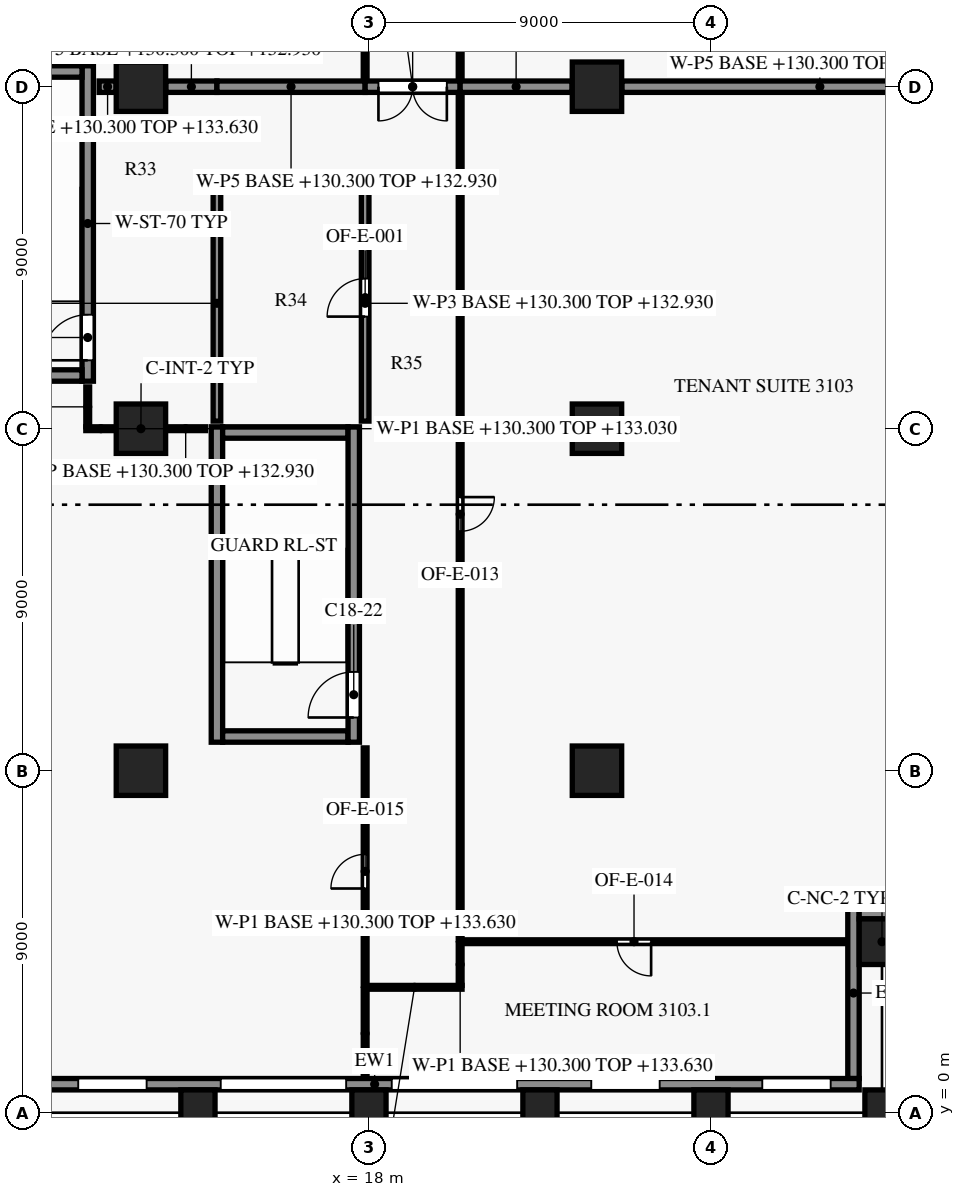
"""IFC4 building model, lengths in metres.
Left out: names, types, materials, properties, quantities, classifications, styles, units other than length and angle.
Written with IfcOpenShell. Run it as: python <this file> out.ifc"""

import sys

from ifc_helpers import new_model, si_unit, direction, frame, frame_2d, origin, origin_2d, place, context, subcontext, project, spatial, rectangle, extrude, element, fill, save


model = new_model("IFC4")
c1 = context("Model", 3, precision=1e-05, world=origin(), true_north=direction((0.0, 1.0)))
c2 = subcontext(c1, "Body", "Model", "MODEL_VIEW")
j1 = project(units=[si_unit("LENGTHUNIT", "METRE"), si_unit("PLANEANGLEUNIT", "RADIAN")], contexts=[c1])
p1 = place(None, origin())
s1 = spatial("IfcSite", under=j1, at=p1, CompositionType="ELEMENT")
p2 = place(p1, origin())
s2 = spatial("IfcBuilding", under=s1, at=p2, CompositionType="ELEMENT")
p3 = place(p2, frame((0.0, 0.0, 130.3)))
s3 = spatial("IfcBuildingStorey", under=s2, at=p3, CompositionType="ELEMENT", Elevation=130.3)
for number, where, z_axis, x_axis in (
    (1, (13.5, 0.0, 0.0), (0.0, 0.0, 1.0), (1.0, 0.0, 0.0)),
    (2, (18.0, 0.0, 0.0), (0.0, 0.0, 1.0), (1.0, 0.0, 0.0)),
    (3, (22.5, 0.0, 0.0), (0.0, 0.0, 1.0), (1.0, 0.0, 0.0)),
    (4, (27.0, 0.0, 0.0), (0.0, 0.0, 1.0), (1.0, 0.0, 0.0)),
    (5, (31.5, 0.0, 0.0), (0.0, 0.0, 1.0), (1.0, 0.0, 0.0)),
):
    element("IfcColumn", number, at=place(p3, frame(where, z_axis=z_axis, x_axis=x_axis)), inside=s3, PredefinedType="COLUMN", context=c2, shape_type="SweptSolid", body=[
        extrude(rectangle(XDim=0.9, YDim=1.2, at=origin_2d()), origin(), (0.0, 0.0, 1.0), 3.8),
    ])
p4 = place(p3, frame((31.5, 4.5, 0.0), z_axis=(0.0, 0.0, 1.0), x_axis=(1.0, 0.0, 0.0)))
e6 = element("IfcColumn", 6, at=p4, inside=s3, PredefinedType="COLUMN", context=c2, shape_type="SweptSolid", body=[
    extrude(rectangle(XDim=1.2, YDim=1.2, at=origin_2d()), origin(), (0.0, 0.0, 1.0), 3.8),
])
for number, where, z_axis, x_axis in (
    (7, (12.0, 9.0, 0.0), (0.0, 0.0, 1.0), (1.0, 0.0, 0.0)),
    (8, (12.0, 18.0, 0.0), (0.0, 0.0, 1.0), (1.0, 0.0, 0.0)),
    (9, (12.0, 27.0, 0.0), (0.0, 0.0, 1.0), (1.0, 0.0, 0.0)),
    (10, (24.0, 9.0, 0.0), (0.0, 0.0, 1.0), (1.0, 0.0, 0.0)),
    (11, (24.0, 18.0, 0.0), (0.0, 0.0, 1.0), (1.0, 0.0, 0.0)),
    (12, (24.0, 27.0, 0.0), (0.0, 0.0, 1.0), (1.0, 0.0, 0.0)),
):
    element("IfcColumn", number, at=place(p3, frame(where, z_axis=z_axis, x_axis=x_axis)), inside=s3, PredefinedType="COLUMN", context=c2, shape_type="SweptSolid", body=[
        extrude(rectangle(XDim=1.3, YDim=1.3, at=origin_2d()), origin(), (0.0, 0.0, 1.0), 3.8),
    ])
p5 = place(p3, frame((30.9, 0.75, 0.0), z_axis=(0.0, 0.0, 1.0), x_axis=(-1.0, 0.0, 0.0)))
e13 = element("IfcWall", 13, at=p5, inside=s3, PredefinedType="SOLIDWALL", context=c2, shape_type="SweptSolid", body=[
    extrude(rectangle(XDim=25.5, YDim=0.3, at=frame_2d((12.75, 0.0))), origin(), (0.0, 0.0, 1.0), 3.15),
])
p6 = place(p5, frame((0.75, 0.0, 0.75)))
e14 = element("IfcOpeningElement", 14, at=p6, cuts=e13, PredefinedType="OPENING", context=c2, shape_type="SweptSolid", body=[
    extrude(rectangle(XDim=1.8, YDim=1.8, at=frame_2d((0.9, 0.9))), frame((0.0, 0.16, 0.0), z_axis=(0.0, -1.0, 0.0), x_axis=(1.0, 0.0, 0.0)), (0.0, 0.0, 1.0), 0.32),
])
p7 = place(p5, frame((5.25, 0.0, 0.75)))
e15 = element("IfcOpeningElement", 15, at=p7, cuts=e13, PredefinedType="OPENING", context=c2, shape_type="SweptSolid", body=[
    extrude(rectangle(XDim=1.8, YDim=1.8, at=frame_2d((0.9, 0.9))), frame((0.0, 0.16, 0.0), z_axis=(0.0, -1.0, 0.0), x_axis=(1.0, 0.0, 0.0)), (0.0, 0.0, 1.0), 0.32),
])
p8 = place(p5, frame((9.0, 0.0, 0.15)))
e16 = element("IfcOpeningElement", 16, at=p8, cuts=e13, PredefinedType="OPENING", context=c2, shape_type="SweptSolid", body=[
    extrude(rectangle(XDim=3.3, YDim=2.4, at=frame_2d((1.65, 1.2))), frame((0.0, 0.16, 0.0), z_axis=(0.0, -1.0, 0.0), x_axis=(1.0, 0.0, 0.0)), (0.0, 0.0, 1.0), 0.32),
])
p9 = place(p5, frame((13.5, 0.0, 0.15)))
e17 = element("IfcOpeningElement", 17, at=p9, cuts=e13, PredefinedType="OPENING", context=c2, shape_type="SweptSolid", body=[
    extrude(rectangle(XDim=3.3, YDim=2.4, at=frame_2d((1.65, 1.2))), frame((0.0, 0.16, 0.0), z_axis=(0.0, -1.0, 0.0), x_axis=(1.0, 0.0, 0.0)), (0.0, 0.0, 1.0), 0.32),
])
p10 = place(p5, frame((18.75, 0.0, 0.75)))
e18 = element("IfcOpeningElement", 18, at=p10, cuts=e13, PredefinedType="OPENING", context=c2, shape_type="SweptSolid", body=[
    extrude(rectangle(XDim=1.8, YDim=1.8, at=frame_2d((0.9, 0.9))), frame((0.0, 0.16, 0.0), z_axis=(0.0, -1.0, 0.0), x_axis=(1.0, 0.0, 0.0)), (0.0, 0.0, 1.0), 0.32),
])
p11 = place(p5, frame((23.25, 0.0, 0.75)))
e19 = element("IfcOpeningElement", 19, at=p11, cuts=e13, PredefinedType="OPENING", context=c2, shape_type="SweptSolid", body=[
    extrude(rectangle(XDim=1.8, YDim=1.8, at=frame_2d((0.9, 0.9))), frame((0.0, 0.16, 0.0), z_axis=(0.0, -1.0, 0.0), x_axis=(1.0, 0.0, 0.0)), (0.0, 0.0, 1.0), 0.32),
])
p12 = place(p3, frame((30.75, 5.4, 0.0), z_axis=(0.0, 0.0, 1.0), x_axis=(0.0, -1.0, 0.0)))
e20 = element("IfcWall", 20, at=p12, inside=s3, PredefinedType="SOLIDWALL", context=c2, shape_type="SweptSolid", body=[
    extrude(rectangle(XDim=4.502, YDim=0.3, at=frame_2d((2.251, 0.0))), origin(), (0.0, 0.0, 1.0), 3.15),
])
p13 = place(p3, frame((35.787, 5.25, 0.0), z_axis=(0.0, 0.0, 1.0), x_axis=(-1.0, 0.0, 0.0)))
e21 = element("IfcWall", 21, at=p13, inside=s3, PredefinedType="SOLIDWALL", context=c2, shape_type="SweptSolid", body=[
    extrude(rectangle(XDim=4.887, YDim=0.3, at=frame_2d((2.444, 0.0))), origin(), (0.0, 0.0, 1.0), 3.15),
])
for number, where, z_axis, x_axis in (
    (22, (14.15, 9.9, 0.0), (0.0, 0.0, 1.0), (1.0, 0.0, 0.0)),
    (23, (14.15, 17.9, 0.0), (0.0, 0.0, 1.0), (1.0, 0.0, 0.0)),
    (24, (7.15, 19.4, 0.0), (0.0, 0.0, 1.0), (1.0, 0.0, 0.0)),
    (25, (7.15, 27.4, 0.0), (0.0, 0.0, 1.0), (1.0, 0.0, 0.0)),
):
    element("IfcWall", number, at=place(p3, frame(where, z_axis=z_axis, x_axis=x_axis)), inside=s3, PredefinedType="SHEAR", context=c2, shape_type="SweptSolid", body=[
        extrude(rectangle(XDim=3.3, YDim=0.3, at=frame_2d((1.65, 0.0))), origin(), (0.0, 0.0, 1.0), 3.5),
    ])
p14 = place(p3, frame((10.6, 19.25, 0.0), z_axis=(0.0, 0.0, 1.0), x_axis=(0.0, 1.0, 0.0)))
e26 = element("IfcWall", 26, at=p14, inside=s3, PredefinedType="SHEAR", context=c2, shape_type="SweptSolid", body=[
    extrude(rectangle(XDim=8.3, YDim=0.3, at=frame_2d((4.15, 0.0))), origin(), (0.0, 0.0, 1.0), 3.5),
])
p15 = place(p14, frame((0.55, 0.0, 0.0)))
e27 = element("IfcOpeningElement", 27, at=p15, cuts=e26, PredefinedType="OPENING", context=c2, shape_type="SweptSolid", body=[
    extrude(rectangle(XDim=1.2, YDim=2.2, at=frame_2d((0.6, 1.1))), frame((0.0, 0.16, 0.0), z_axis=(0.0, -1.0, 0.0), x_axis=(1.0, 0.0, 0.0)), (0.0, 0.0, 1.0), 0.32),
])
p16 = place(p3, frame((14.0, 9.75, 0.0), z_axis=(0.0, 0.0, 1.0), x_axis=(0.0, 1.0, 0.0)))
e28 = element("IfcWall", 28, at=p16, inside=s3, PredefinedType="SHEAR", context=c2, shape_type="SweptSolid", body=[
    extrude(rectangle(XDim=8.3, YDim=0.3, at=frame_2d((4.15, 0.0))), origin(), (0.0, 0.0, 1.0), 3.5),
])
p17 = place(p3, frame((17.6, 9.75, 0.0), z_axis=(0.0, 0.0, 1.0), x_axis=(0.0, 1.0, 0.0)))
e29 = element("IfcWall", 29, at=p17, inside=s3, PredefinedType="SHEAR", context=c2, shape_type="SweptSolid", body=[
    extrude(rectangle(XDim=8.3, YDim=0.3, at=frame_2d((4.15, 0.0))), origin(), (0.0, 0.0, 1.0), 3.5),
])
p18 = place(p17, frame((0.65, 0.0, 0.0)))
e30 = element("IfcOpeningElement", 30, at=p18, cuts=e29, PredefinedType="OPENING", context=c2, shape_type="SweptSolid", body=[
    extrude(rectangle(XDim=1.2, YDim=2.2, at=frame_2d((0.6, 1.1))), frame((0.0, 0.16, 0.0), z_axis=(0.0, -1.0, 0.0), x_axis=(1.0, 0.0, 0.0)), (0.0, 0.0, 1.0), 0.32),
])
p19 = place(p3, frame((17.9, 0.92, 0.0), z_axis=(0.0, 0.0, 1.0), x_axis=(0.0, 1.0, 0.0)))
e31 = element("IfcWall", 31, at=p19, inside=s3, PredefinedType="PARTITIONING", context=c2, shape_type="SweptSolid", body=[
    extrude(rectangle(XDim=2.33, YDim=0.1, at=frame_2d((1.165, 0.0))), origin(), (0.0, 0.0, 1.0), 3.33),
])
p20 = place(p3, frame((20.45, 3.3, 0.0), z_axis=(0.0, 0.0, 1.0), x_axis=(-1.0, 0.0, 0.0)))
e32 = element("IfcWall", 32, at=p20, inside=s3, PredefinedType="PARTITIONING", context=c2, shape_type="SweptSolid", body=[
    extrude(rectangle(XDim=2.5, YDim=0.1, at=frame_2d((1.25, 0.0))), origin(), (0.0, 0.0, 1.0), 3.33),
])
p21 = place(p3, frame((17.9, 3.35, 0.0), z_axis=(0.0, 0.0, 1.0), x_axis=(0.0, 1.0, 0.0)))
e33 = element("IfcWall", 33, at=p21, inside=s3, PredefinedType="PARTITIONING", context=c2, shape_type="SweptSolid", body=[
    extrude(rectangle(XDim=6.25, YDim=0.1, at=frame_2d((3.125, 0.0))), origin(), (0.0, 0.0, 1.0), 2.63),
])
p22 = place(p21, frame((2.55, 0.0, 0.0)))
e34 = element("IfcOpeningElement", 34, at=p22, cuts=e33, PredefinedType="OPENING", context=c2, shape_type="SweptSolid", body=[
    extrude(rectangle(XDim=0.9, YDim=2.1, at=frame_2d((0.45, 1.05))), frame((0.0, 0.06, 0.0), z_axis=(0.0, -1.0, 0.0), x_axis=(1.0, 0.0, 0.0)), (0.0, 0.0, 1.0), 0.12),
])
p23 = place(p3, frame((20.4, 4.45, 0.0), z_axis=(0.0, 0.0, 1.0), x_axis=(0.0, -1.0, 0.0)))
e35 = element("IfcWall", 35, at=p23, inside=s3, PredefinedType="PARTITIONING", context=c2, shape_type="SweptSolid", body=[
    extrude(rectangle(XDim=1.1, YDim=0.1, at=frame_2d((0.55, 0.0))), origin(), (0.0, 0.0, 1.0), 3.33),
])
p24 = place(p3, frame((30.58, 4.5, 0.0), z_axis=(0.0, 0.0, 1.0), x_axis=(-1.0, 0.0, 0.0)))
e36 = element("IfcWall", 36, at=p24, inside=s3, PredefinedType="PARTITIONING", context=c2, shape_type="SweptSolid", body=[
    extrude(rectangle(XDim=10.13, YDim=0.1, at=frame_2d((5.065, 0.0))), origin(), (0.0, 0.0, 1.0), 2.63),
])
p25 = place(p24, frame((5.155, 0.0, 0.0)))
e37 = element("IfcOpeningElement", 37, at=p25, cuts=e36, PredefinedType="OPENING", context=c2, shape_type="SweptSolid", body=[
    extrude(rectangle(XDim=0.9, YDim=2.1, at=frame_2d((0.45, 1.05))), frame((0.0, 0.06, 0.0), z_axis=(0.0, -1.0, 0.0), x_axis=(1.0, 0.0, 0.0)), (0.0, 0.0, 1.0), 0.12),
])
p26 = place(p3, frame((11.345, 18.0, 0.0), z_axis=(0.0, 0.0, 1.0), x_axis=(-1.0, 0.0, 0.0)))
e38 = element("IfcWall", 38, at=p26, inside=s3, PredefinedType="PARTITIONING", context=c2, shape_type="SweptSolid", body=[
    extrude(rectangle(XDim=0.795, YDim=0.1, at=frame_2d((0.397, 0.0))), origin(), (0.0, 0.0, 1.0), 2.73),
])
p27 = place(p3, frame((13.7, 18.0, 0.0), z_axis=(0.0, 0.0, 1.0), x_axis=(-1.0, 0.0, 0.0)))
e39 = element("IfcWall", 39, at=p27, inside=s3, PredefinedType="PARTITIONING", context=c2, shape_type="SweptSolid", body=[
    extrude(rectangle(XDim=1.045, YDim=0.1, at=frame_2d((0.522, 0.0))), origin(), (0.0, 0.0, 1.0), 2.63),
])
p28 = place(p3, frame((10.6, 18.05, 0.0), z_axis=(0.0, 0.0, 1.0), x_axis=(0.0, 1.0, 0.0)))
e40 = element("IfcWall", 40, at=p28, inside=s3, PredefinedType="PARTITIONING", context=c2, shape_type="SweptSolid", body=[
    extrude(rectangle(XDim=1.05, YDim=0.1, at=frame_2d((0.525, 0.0))), origin(), (0.0, 0.0, 1.0), 2.73),
])
p29 = place(p3, frame((17.9, 18.2, 0.0), z_axis=(0.0, 0.0, 1.0), x_axis=(0.0, 1.0, 0.0)))
e41 = element("IfcWall", 41, at=p29, inside=s3, PredefinedType="PARTITIONING", context=c2, shape_type="SweptSolid", body=[
    extrude(rectangle(XDim=6.2, YDim=0.2, at=frame_2d((3.1, 0.0))), origin(), (0.0, 0.0, 1.0), 2.63),
])
p30 = place(p29, frame((2.75, 0.0, 0.0)))
e42 = element("IfcOpeningElement", 42, at=p30, cuts=e41, PredefinedType="OPENING", context=c2, shape_type="SweptSolid", body=[
    extrude(rectangle(XDim=1.0, YDim=2.1, at=frame_2d((0.5, 1.05))), frame((0.0, 0.11, 0.0), z_axis=(0.0, -1.0, 0.0), x_axis=(1.0, 0.0, 0.0)), (0.0, 0.0, 1.0), 0.22),
])
p31 = place(p3, frame((14.0, 24.4, 0.0), z_axis=(0.0, 0.0, 1.0), x_axis=(0.0, -1.0, 0.0)))
e43 = element("IfcWall", 43, at=p31, inside=s3, PredefinedType="PARTITIONING", context=c2, shape_type="SweptSolid", body=[
    extrude(rectangle(XDim=6.2, YDim=0.2, at=frame_2d((3.1, 0.0))), origin(), (0.0, 0.0, 1.0), 3.33),
])
p32 = place(p3, frame((18.0, 24.5, 0.0), z_axis=(0.0, 0.0, 1.0), x_axis=(-1.0, 0.0, 0.0)))
e44 = element("IfcWall", 44, at=p32, inside=s3, PredefinedType="PARTITIONING", context=c2, shape_type="SweptSolid", body=[
    extrude(rectangle(XDim=4.1, YDim=0.2, at=frame_2d((2.05, 0.0))), origin(), (0.0, 0.0, 1.0), 2.63),
])
p33 = place(p3, frame((20.4, 26.83, 0.0), z_axis=(0.0, 0.0, 1.0), x_axis=(0.0, -1.0, 0.0)))
e45 = element("IfcWall", 45, at=p33, inside=s3, PredefinedType="PARTITIONING", context=c2, shape_type="SweptSolid", body=[
    extrude(rectangle(XDim=22.28, YDim=0.1, at=frame_2d((11.14, 0.0))), origin(), (0.0, 0.0, 1.0), 2.63),
])
p34 = place(p33, frame((10.63, 0.0, 0.0)))
e46 = element("IfcOpeningElement", 46, at=p34, cuts=e45, PredefinedType="OPENING", context=c2, shape_type="SweptSolid", body=[
    extrude(rectangle(XDim=0.9, YDim=2.1, at=frame_2d((0.45, 1.05))), frame((0.0, 0.06, 0.0), z_axis=(0.0, -1.0, 0.0), x_axis=(1.0, 0.0, 0.0)), (0.0, 0.0, 1.0), 0.12),
])
p35 = place(p3, frame((10.9, 27.0, 0.0), z_axis=(0.0, 0.0, 1.0), x_axis=(1.0, 0.0, 0.0)))
e47 = element("IfcWall", 47, at=p35, inside=s3, PredefinedType="PARTITIONING", context=c2, shape_type="SweptSolid", body=[
    extrude(rectangle(XDim=0.445, YDim=0.3, at=frame_2d((0.223, 0.0))), origin(), (0.0, 0.0, 1.0), 3.33),
])
p36 = place(p3, frame((12.655, 27.0, 0.0), z_axis=(0.0, 0.0, 1.0), x_axis=(1.0, 0.0, 0.0)))
e48 = element("IfcWall", 48, at=p36, inside=s3, PredefinedType="PARTITIONING", context=c2, shape_type="SweptSolid", body=[
    extrude(rectangle(XDim=1.345, YDim=0.3, at=frame_2d((0.672, 0.0))), origin(), (0.0, 0.0, 1.0), 2.63),
])
p37 = place(p3, frame((14.0, 27.0, 0.0), z_axis=(0.0, 0.0, 1.0), x_axis=(1.0, 0.0, 0.0)))
e49 = element("IfcWall", 49, at=p37, inside=s3, PredefinedType="PARTITIONING", context=c2, shape_type="SweptSolid", body=[
    extrude(rectangle(XDim=3.9, YDim=0.3, at=frame_2d((1.95, 0.0))), origin(), (0.0, 0.0, 1.0), 2.63),
])
p38 = place(p3, frame((20.4, 27.0, 0.0), z_axis=(0.0, 0.0, 1.0), x_axis=(-1.0, 0.0, 0.0)))
e50 = element("IfcWall", 50, at=p38, inside=s3, PredefinedType="PARTITIONING", context=c2, shape_type="SweptSolid", body=[
    extrude(rectangle(XDim=2.5, YDim=0.3, at=frame_2d((1.25, 0.0))), origin(), (0.0, 0.0, 1.0), 2.63),
])
p39 = place(p38, frame((0.35, 0.0, 0.0)))
e51 = element("IfcOpeningElement", 51, at=p39, cuts=e50, PredefinedType="OPENING", context=c2, shape_type="SweptSolid", body=[
    extrude(rectangle(XDim=1.8, YDim=2.1, at=frame_2d((0.9, 1.05))), frame((0.0, 0.16, 0.0), z_axis=(0.0, -1.0, 0.0), x_axis=(1.0, 0.0, 0.0)), (0.0, 0.0, 1.0), 0.32),
])
p40 = place(p3, frame((20.4, 27.0, 0.0), z_axis=(0.0, 0.0, 1.0), x_axis=(1.0, 0.0, 0.0)))
e52 = element("IfcWall", 52, at=p40, inside=s3, PredefinedType="PARTITIONING", context=c2, shape_type="SweptSolid", body=[
    extrude(rectangle(XDim=2.945, YDim=0.3, at=frame_2d((1.473, 0.0))), origin(), (0.0, 0.0, 1.0), 2.63),
])
p41 = place(p3, frame((24.655, 27.0, 0.0), z_axis=(0.0, 0.0, 1.0), x_axis=(1.0, 0.0, 0.0)))
e53 = element("IfcWall", 53, at=p41, inside=s3, PredefinedType="PARTITIONING", context=c2, shape_type="SweptSolid", body=[
    extrude(rectangle(XDim=10.42, YDim=0.3, at=frame_2d((5.21, 0.0))), origin(), (0.0, 0.0, 1.0), 2.63),
])
for number, where, z_axis, x_axis in (
    (54, (17.9, 27.17, 0.0), (0.0, 0.0, 1.0), (0.0, 1.0, 0.0)),
    (55, (20.4, 33.45, 0.0), (0.0, 0.0, 1.0), (0.0, -1.0, 0.0)),
):
    element("IfcWall", number, at=place(p3, frame(where, z_axis=z_axis, x_axis=x_axis)), inside=s3, PredefinedType="PARTITIONING", context=c2, shape_type="SweptSolid", body=[
        extrude(rectangle(XDim=6.28, YDim=0.1, at=frame_2d((3.14, 0.0))), origin(), (0.0, 0.0, 1.0), 2.63),
    ])
p42 = place(p6, origin())
e56 = element("IfcWindow", 56, at=p42, inside=s3, PartitioningType="SINGLE_PANEL", PredefinedType="WINDOW", context=c2, shape_type="SweptSolid", body=[
    extrude(rectangle(XDim=1.8, YDim=1.8, at=frame_2d((0.9, 0.9))), frame((0.0, 0.03, 0.0), z_axis=(0.0, -1.0, 0.0), x_axis=(1.0, 0.0, 0.0)), (0.0, 0.0, 1.0), 0.06),
])
fill(e14, e56)
p43 = place(p7, origin())
e57 = element("IfcWindow", 57, at=p43, inside=s3, PartitioningType="SINGLE_PANEL", PredefinedType="WINDOW", context=c2, shape_type="SweptSolid", body=[
    extrude(rectangle(XDim=1.8, YDim=1.8, at=frame_2d((0.9, 0.9))), frame((0.0, 0.03, 0.0), z_axis=(0.0, -1.0, 0.0), x_axis=(1.0, 0.0, 0.0)), (0.0, 0.0, 1.0), 0.06),
])
fill(e15, e57)
p44 = place(p8, origin())
e58 = element("IfcWindow", 58, at=p44, inside=s3, PartitioningType="SINGLE_PANEL", PredefinedType="WINDOW", context=c2, shape_type="SweptSolid", body=[
    extrude(rectangle(XDim=3.3, YDim=2.4, at=frame_2d((1.65, 1.2))), frame((0.0, 0.03, 0.0), z_axis=(0.0, -1.0, 0.0), x_axis=(1.0, 0.0, 0.0)), (0.0, 0.0, 1.0), 0.06),
])
fill(e16, e58)
p45 = place(p9, origin())
e59 = element("IfcWindow", 59, at=p45, inside=s3, PartitioningType="SINGLE_PANEL", PredefinedType="WINDOW", context=c2, shape_type="SweptSolid", body=[
    extrude(rectangle(XDim=3.3, YDim=2.4, at=frame_2d((1.65, 1.2))), frame((0.0, 0.03, 0.0), z_axis=(0.0, -1.0, 0.0), x_axis=(1.0, 0.0, 0.0)), (0.0, 0.0, 1.0), 0.06),
])
fill(e17, e59)
p46 = place(p10, origin())
e60 = element("IfcWindow", 60, at=p46, inside=s3, PartitioningType="SINGLE_PANEL", PredefinedType="WINDOW", context=c2, shape_type="SweptSolid", body=[
    extrude(rectangle(XDim=1.8, YDim=1.8, at=frame_2d((0.9, 0.9))), frame((0.0, 0.03, 0.0), z_axis=(0.0, -1.0, 0.0), x_axis=(1.0, 0.0, 0.0)), (0.0, 0.0, 1.0), 0.06),
])
fill(e18, e60)
p47 = place(p15, origin())
e61 = element("IfcDoor", 61, at=p47, inside=s3, OperationType="SINGLE_SWING_RIGHT", PredefinedType="DOOR", context=c2, shape_type="SweptSolid", body=[
    extrude(rectangle(XDim=1.2, YDim=2.2, at=frame_2d((0.6, 1.1))), frame((0.0, 0.025, 0.0), z_axis=(0.0, -1.0, 0.0), x_axis=(1.0, 0.0, 0.0)), (0.0, 0.0, 1.0), 0.05),
])
fill(e27, e61)
p48 = place(p18, origin())
e62 = element("IfcDoor", 62, at=p48, inside=s3, OperationType="SINGLE_SWING_LEFT", PredefinedType="DOOR", context=c2, shape_type="SweptSolid", body=[
    extrude(rectangle(XDim=1.2, YDim=2.2, at=frame_2d((0.6, 1.1))), frame((0.0, 0.025, 0.0), z_axis=(0.0, -1.0, 0.0), x_axis=(1.0, 0.0, 0.0)), (0.0, 0.0, 1.0), 0.05),
])
fill(e30, e62)
p49 = place(p30, origin())
e63 = element("IfcDoor", 63, at=p49, inside=s3, OperationType="SINGLE_SWING_LEFT", PredefinedType="DOOR", context=c2, shape_type="SweptSolid", body=[
    extrude(rectangle(XDim=1.0, YDim=2.1, at=frame_2d((0.5, 1.05))), frame((0.0, 0.025, 0.0), z_axis=(0.0, -1.0, 0.0), x_axis=(1.0, 0.0, 0.0)), (0.0, 0.0, 1.0), 0.05),
])
fill(e42, e63)
p50 = place(p34, origin())
e64 = element("IfcDoor", 64, at=p50, inside=s3, OperationType="SINGLE_SWING_LEFT", PredefinedType="DOOR", context=c2, shape_type="SweptSolid", body=[
    extrude(rectangle(XDim=0.9, YDim=2.1, at=frame_2d((0.45, 1.05))), frame((0.0, 0.025, 0.0), z_axis=(0.0, -1.0, 0.0), x_axis=(1.0, 0.0, 0.0)), (0.0, 0.0, 1.0), 0.05),
])
fill(e46, e64)
p51 = place(p25, origin())
e65 = element("IfcDoor", 65, at=p51, inside=s3, OperationType="SINGLE_SWING_LEFT", PredefinedType="DOOR", context=c2, shape_type="SweptSolid", body=[
    extrude(rectangle(XDim=0.9, YDim=2.1, at=frame_2d((0.45, 1.05))), frame((0.0, 0.025, 0.0), z_axis=(0.0, -1.0, 0.0), x_axis=(1.0, 0.0, 0.0)), (0.0, 0.0, 1.0), 0.05),
])
fill(e37, e65)
p52 = place(p22, origin())
e66 = element("IfcDoor", 66, at=p52, inside=s3, OperationType="SINGLE_SWING_LEFT", PredefinedType="DOOR", context=c2, shape_type="SweptSolid", body=[
    extrude(rectangle(XDim=0.9, YDim=2.1, at=frame_2d((0.45, 1.05))), frame((0.0, 0.025, 0.0), z_axis=(0.0, -1.0, 0.0), x_axis=(1.0, 0.0, 0.0)), (0.0, 0.0, 1.0), 0.05),
])
fill(e34, e66)
p53 = place(p39, origin())
e67 = element("IfcDoor", 67, at=p53, inside=s3, OperationType="DOUBLE_DOOR_SINGLE_SWING", PredefinedType="DOOR", context=c2, shape_type="SweptSolid", body=[
    extrude(rectangle(XDim=1.8, YDim=2.1, at=frame_2d((0.9, 1.05))), frame((0.0, 0.025, 0.0), z_axis=(0.0, -1.0, 0.0), x_axis=(1.0, 0.0, 0.0)), (0.0, 0.0, 1.0), 0.05),
])
fill(e51, e67)
save(model, sys.argv[1])
